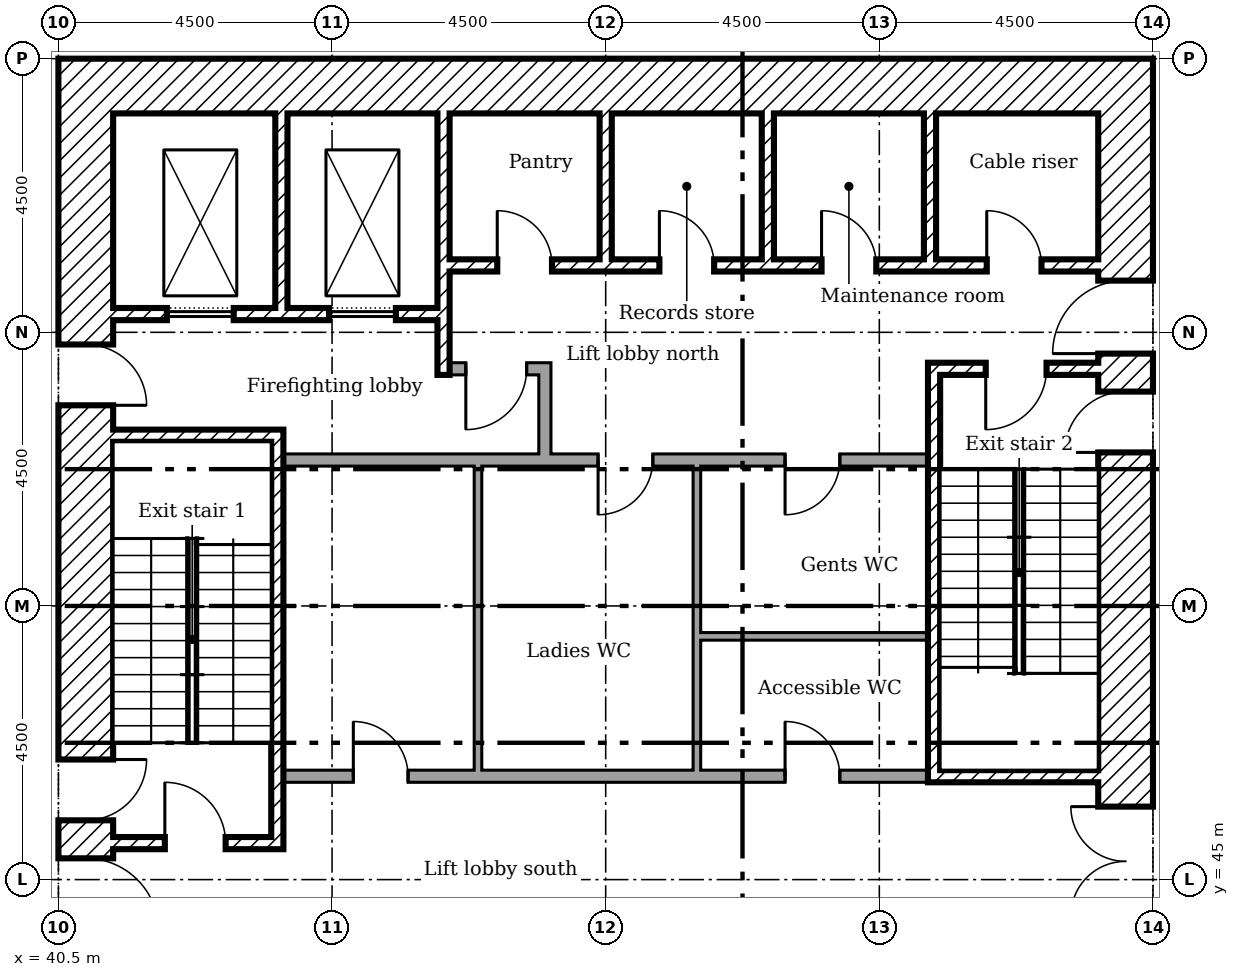
"""IFC4 building model, lengths in metres.
Left out: names, types, materials, properties, quantities, classifications, styles, units other than length and angle.
Written with IfcOpenShell. Run it as: python <this file> out.ifc"""

import sys

from ifc_helpers import new_model, si_unit, direction, frame, frame_2d, origin, place, context, subcontext, project, spatial, rectangle, extrude, element, fill, save


model = new_model("IFC4")
c1 = context("Model", 3, precision=1e-05, world=origin(), true_north=direction((0.0, 1.0)))
c2 = subcontext(c1, "Body", "Model", "MODEL_VIEW")
j1 = project(units=[si_unit("LENGTHUNIT", "METRE"), si_unit("PLANEANGLEUNIT", "RADIAN")], contexts=[c1])
p1 = place(None, origin())
s1 = spatial("IfcSite", under=j1, at=p1, CompositionType="ELEMENT")
p2 = place(p1, origin())
s2 = spatial("IfcBuilding", under=s1, at=p2, CompositionType="ELEMENT")
p3 = place(p2, frame((0.0, 0.0, 25.4)))
s3 = spatial("IfcBuildingStorey", under=s2, at=p3, CompositionType="ELEMENT", Elevation=25.4)
p4 = place(p3, frame((58.05, 40.5, 0.0), z_axis=(0.0, 0.0, 1.0), x_axis=(0.0, 1.0, 0.0)))
e1 = element("IfcWall", 1, at=p4, inside=s3, PredefinedType="SHEAR", context=c2, shape_type="SweptSolid", body=[
    extrude(rectangle(XDim=18.0, YDim=0.9, at=frame_2d((9.0, 0.0))), origin(), (0.0, 0.0, 1.0), 4.125),
])
p5 = place(p4, frame((13.15, 0.0, 0.0)))
e2 = element("IfcOpeningElement", 2, at=p5, cuts=e1, PredefinedType="OPENING", context=c2, shape_type="SweptSolid", body=[
    extrude(rectangle(XDim=1.2, YDim=2.1, at=frame_2d((0.6, 1.05))), frame((0.0, 0.46, 0.0), z_axis=(0.0, -1.0, 0.0), x_axis=(1.0, 0.0, 0.0)), (0.0, 0.0, 1.0), 0.92),
])
p6 = place(p4, frame((3.9, 0.0, 0.0)))
e3 = element("IfcOpeningElement", 3, at=p6, cuts=e1, PredefinedType="OPENING", context=c2, shape_type="SweptSolid", body=[
    extrude(rectangle(XDim=1.8, YDim=2.1, at=frame_2d((0.9, 1.05))), frame((0.0, 0.46, 0.0), z_axis=(0.0, -1.0, 0.0), x_axis=(1.0, 0.0, 0.0)), (0.0, 0.0, 1.0), 0.92),
])
p7 = place(p4, frame((11.525, 0.0, 0.0)))
e4 = element("IfcOpeningElement", 4, at=p7, cuts=e1, PredefinedType="OPENING", context=c2, shape_type="SweptSolid", body=[
    extrude(rectangle(XDim=1.0, YDim=2.1, at=frame_2d((0.5, 1.05))), frame((0.0, 0.46, 0.0), z_axis=(0.0, -1.0, 0.0), x_axis=(1.0, 0.0, 0.0)), (0.0, 0.0, 1.0), 0.92),
])
p8 = place(p3, frame((41.4, 58.05, 0.0)))
e5 = element("IfcWall", 5, at=p8, inside=s3, PredefinedType="SHEAR", context=c2, shape_type="SweptSolid", body=[
    extrude(rectangle(XDim=16.2, YDim=0.9, at=frame_2d((8.1, 0.0))), origin(), (0.0, 0.0, 1.0), 4.125),
])
p9 = place(p3, frame((40.95, 40.5, 0.0), z_axis=(0.0, 0.0, 1.0), x_axis=(0.0, 1.0, 0.0)))
e6 = element("IfcWall", 6, at=p9, inside=s3, PredefinedType="SHEAR", context=c2, shape_type="SweptSolid", body=[
    extrude(rectangle(XDim=18.0, YDim=0.9, at=frame_2d((9.0, 0.0))), origin(), (0.0, 0.0, 1.0), 4.125),
])
p10 = place(p9, frame((3.65, 0.0, 0.0)))
e7 = element("IfcOpeningElement", 7, at=p10, cuts=e6, PredefinedType="OPENING", context=c2, shape_type="SweptSolid", body=[
    extrude(rectangle(XDim=1.2, YDim=2.1, at=frame_2d((0.6, 1.05))), frame((0.0, 0.46, 0.0), z_axis=(0.0, -1.0, 0.0), x_axis=(1.0, 0.0, 0.0)), (0.0, 0.0, 1.0), 0.92),
])
p11 = place(p9, frame((5.475, 0.0, 0.0)))
e8 = element("IfcOpeningElement", 8, at=p11, cuts=e6, PredefinedType="OPENING", context=c2, shape_type="SweptSolid", body=[
    extrude(rectangle(XDim=1.0, YDim=2.1, at=frame_2d((0.5, 1.05))), frame((0.0, 0.46, 0.0), z_axis=(0.0, -1.0, 0.0), x_axis=(1.0, 0.0, 0.0)), (0.0, 0.0, 1.0), 0.92),
])
p12 = place(p9, frame((12.3, 0.0, 0.0)))
e9 = element("IfcOpeningElement", 9, at=p12, cuts=e6, PredefinedType="OPENING", context=c2, shape_type="SweptSolid", body=[
    extrude(rectangle(XDim=1.0, YDim=2.1, at=frame_2d((0.5, 1.05))), frame((0.0, 0.46, 0.0), z_axis=(0.0, -1.0, 0.0), x_axis=(1.0, 0.0, 0.0)), (0.0, 0.0, 1.0), 0.92),
])
p13 = place(p3, frame((44.167, 57.6, 0.0), z_axis=(0.0, 0.0, 1.0), x_axis=(0.0, -1.0, 0.0)))
e10 = element("IfcWall", 10, at=p13, inside=s3, PredefinedType="SHEAR", context=c2, shape_type="SweptSolid", body=[
    extrude(rectangle(XDim=3.2, YDim=0.2, at=frame_2d((1.6, 0.0))), origin(), (0.0, 0.0, 1.0), 4.125),
])
p14 = place(p3, frame((46.833, 57.6, 0.0), z_axis=(0.0, 0.0, 1.0), x_axis=(0.0, -1.0, 0.0)))
e11 = element("IfcWall", 11, at=p14, inside=s3, PredefinedType="SHEAR", context=c2, shape_type="SweptSolid", body=[
    extrude(rectangle(XDim=4.3, YDim=0.2, at=frame_2d((2.15, 0.0))), origin(), (0.0, 0.0, 1.0), 4.125),
])
for number, where, z_axis, x_axis in (
    (12, (49.5, 57.6, 0.0), (0.0, 0.0, 1.0), (0.0, -1.0, 0.0)),
    (13, (52.167, 57.6, 0.0), (0.0, 0.0, 1.0), (0.0, -1.0, 0.0)),
    (14, (54.833, 57.6, 0.0), (0.0, 0.0, 1.0), (0.0, -1.0, 0.0)),
):
    element("IfcWall", number, at=place(p3, frame(where, z_axis=z_axis, x_axis=x_axis)), inside=s3, PredefinedType="SHEAR", context=c2, shape_type="SweptSolid", body=[
        extrude(rectangle(XDim=2.4, YDim=0.2, at=frame_2d((1.2, 0.0))), origin(), (0.0, 0.0, 1.0), 4.125),
    ])
p15 = place(p3, frame((48.5, 51.9, 0.0), z_axis=(0.0, 0.0, 1.0), x_axis=(0.0, 1.0, 0.0)))
e15 = element("IfcWall", 15, at=p15, inside=s3, PredefinedType="PARTITIONING", context=c2, shape_type="SweptSolid", body=[
    extrude(rectangle(XDim=1.6, YDim=0.2, at=frame_2d((0.8, 0.0))), origin(), (0.0, 0.0, 1.0), 4.125),
])
p16 = place(p3, frame((46.933, 53.4, 0.0)))
e16 = element("IfcWall", 16, at=p16, inside=s3, PredefinedType="PARTITIONING", context=c2, shape_type="SweptSolid", body=[
    extrude(rectangle(XDim=1.467, YDim=0.2, at=frame_2d((0.733, 0.0))), origin(), (0.0, 0.0, 1.0), 4.125),
])
p17 = place(p16, frame((0.267, 0.0, 0.0)))
e17 = element("IfcOpeningElement", 17, at=p17, cuts=e16, PredefinedType="OPENING", context=c2, shape_type="SweptSolid", body=[
    extrude(rectangle(XDim=1.0, YDim=2.1, at=frame_2d((0.5, 1.05))), frame((0.0, 0.11, 0.0), z_axis=(0.0, -1.0, 0.0), x_axis=(1.0, 0.0, 0.0)), (0.0, 0.0, 1.0), 0.22),
])
p18 = place(p3, frame((46.933, 55.1, 0.0)))
e18 = element("IfcWall", 18, at=p18, inside=s3, PredefinedType="SHEAR", context=c2, shape_type="SweptSolid", body=[
    extrude(rectangle(XDim=10.667, YDim=0.2, at=frame_2d((5.333, 0.0))), origin(), (0.0, 0.0, 1.0), 4.125),
])
p19 = place(p18, frame((8.833, 0.0, 0.0)))
e19 = element("IfcOpeningElement", 19, at=p19, cuts=e18, PredefinedType="OPENING", context=c2, shape_type="SweptSolid", body=[
    extrude(rectangle(XDim=0.9, YDim=2.1, at=frame_2d((0.45, 1.05))), frame((0.0, 0.11, 0.0), z_axis=(0.0, -1.0, 0.0), x_axis=(1.0, 0.0, 0.0)), (0.0, 0.0, 1.0), 0.22),
])
p20 = place(p18, frame((0.783, 0.0, 0.0)))
e20 = element("IfcOpeningElement", 20, at=p20, cuts=e18, PredefinedType="OPENING", context=c2, shape_type="SweptSolid", body=[
    extrude(rectangle(XDim=0.9, YDim=2.1, at=frame_2d((0.45, 1.05))), frame((0.0, 0.11, 0.0), z_axis=(0.0, -1.0, 0.0), x_axis=(1.0, 0.0, 0.0)), (0.0, 0.0, 1.0), 0.22),
])
p21 = place(p18, frame((3.45, 0.0, 0.0)))
e21 = element("IfcOpeningElement", 21, at=p21, cuts=e18, PredefinedType="OPENING", context=c2, shape_type="SweptSolid", body=[
    extrude(rectangle(XDim=0.9, YDim=2.1, at=frame_2d((0.45, 1.05))), frame((0.0, 0.11, 0.0), z_axis=(0.0, -1.0, 0.0), x_axis=(1.0, 0.0, 0.0)), (0.0, 0.0, 1.0), 0.22),
])
p22 = place(p18, frame((6.117, 0.0, 0.0)))
e22 = element("IfcOpeningElement", 22, at=p22, cuts=e18, PredefinedType="OPENING", context=c2, shape_type="SweptSolid", body=[
    extrude(rectangle(XDim=0.9, YDim=2.1, at=frame_2d((0.45, 1.05))), frame((0.0, 0.11, 0.0), z_axis=(0.0, -1.0, 0.0), x_axis=(1.0, 0.0, 0.0)), (0.0, 0.0, 1.0), 0.22),
])
p23 = place(p3, frame((41.4, 54.3, 0.0)))
e23 = element("IfcWall", 23, at=p23, inside=s3, PredefinedType="SHEAR", context=c2, shape_type="SweptSolid", body=[
    extrude(rectangle(XDim=5.333, YDim=0.2, at=frame_2d((2.667, 0.0))), origin(), (0.0, 0.0, 1.0), 4.125),
])
p24 = place(p23, frame((0.883, 0.0, 0.0)))
e24 = element("IfcOpeningElement", 24, at=p24, cuts=e23, PredefinedType="OPENING", context=c2, shape_type="SweptSolid", body=[
    extrude(rectangle(XDim=1.1, YDim=2.1, at=frame_2d((0.55, 1.05))), frame((0.0, 0.11, 0.0), z_axis=(0.0, -1.0, 0.0), x_axis=(1.0, 0.0, 0.0)), (0.0, 0.0, 1.0), 0.22),
])
p25 = place(p23, frame((3.55, 0.0, 0.0)))
e25 = element("IfcOpeningElement", 25, at=p25, cuts=e23, PredefinedType="OPENING", context=c2, shape_type="SweptSolid", body=[
    extrude(rectangle(XDim=1.1, YDim=2.1, at=frame_2d((0.55, 1.05))), frame((0.0, 0.11, 0.0), z_axis=(0.0, -1.0, 0.0), x_axis=(1.0, 0.0, 0.0)), (0.0, 0.0, 1.0), 0.22),
])
p26 = place(p3, frame((44.1, 45.5, 0.0), z_axis=(0.0, 0.0, 1.0), x_axis=(0.0, 1.0, 0.0)))
e26 = element("IfcWall", 26, at=p26, inside=s3, PredefinedType="SHEAR", context=c2, shape_type="SweptSolid", body=[
    extrude(rectangle(XDim=6.9, YDim=0.2, at=frame_2d((3.45, 0.0))), origin(), (0.0, 0.0, 1.0), 4.125),
])
p27 = place(p3, frame((41.4, 52.3, 0.0)))
e27 = element("IfcWall", 27, at=p27, inside=s3, PredefinedType="SHEAR", context=c2, shape_type="SweptSolid", body=[
    extrude(rectangle(XDim=2.6, YDim=0.2, at=frame_2d((1.3, 0.0))), origin(), (0.0, 0.0, 1.0), 4.125),
])
p28 = place(p3, frame((41.4, 45.6, 0.0)))
e28 = element("IfcWall", 28, at=p28, inside=s3, PredefinedType="SHEAR", context=c2, shape_type="SweptSolid", body=[
    extrude(rectangle(XDim=2.6, YDim=0.2, at=frame_2d((1.3, 0.0))), origin(), (0.0, 0.0, 1.0), 4.125),
])
p29 = place(p28, frame((0.85, 0.0, 0.0)))
e29 = element("IfcOpeningElement", 29, at=p29, cuts=e28, PredefinedType="OPENING", context=c2, shape_type="SweptSolid", body=[
    extrude(rectangle(XDim=1.0, YDim=2.1, at=frame_2d((0.5, 1.05))), frame((0.0, 0.11, 0.0), z_axis=(0.0, -1.0, 0.0), x_axis=(1.0, 0.0, 0.0)), (0.0, 0.0, 1.0), 0.22),
])
p30 = place(p3, frame((54.8, 53.4, 0.0)))
e30 = element("IfcWall", 30, at=p30, inside=s3, PredefinedType="SHEAR", context=c2, shape_type="SweptSolid", body=[
    extrude(rectangle(XDim=2.8, YDim=0.2, at=frame_2d((1.4, 0.0))), origin(), (0.0, 0.0, 1.0), 4.125),
])
p31 = place(p30, frame((0.95, 0.0, 0.0)))
e31 = element("IfcOpeningElement", 31, at=p31, cuts=e30, PredefinedType="OPENING", context=c2, shape_type="SweptSolid", body=[
    extrude(rectangle(XDim=1.0, YDim=2.1, at=frame_2d((0.5, 1.05))), frame((0.0, 0.11, 0.0), z_axis=(0.0, -1.0, 0.0), x_axis=(1.0, 0.0, 0.0)), (0.0, 0.0, 1.0), 0.22),
])
p32 = place(p3, frame((54.8, 46.7, 0.0)))
e32 = element("IfcWall", 32, at=p32, inside=s3, PredefinedType="SHEAR", context=c2, shape_type="SweptSolid", body=[
    extrude(rectangle(XDim=2.8, YDim=0.2, at=frame_2d((1.4, 0.0))), origin(), (0.0, 0.0, 1.0), 4.125),
])
p33 = place(p3, frame((54.9, 46.8, 0.0), z_axis=(0.0, 0.0, 1.0), x_axis=(0.0, 1.0, 0.0)))
e33 = element("IfcWall", 33, at=p33, inside=s3, PredefinedType="SHEAR", context=c2, shape_type="SweptSolid", body=[
    extrude(rectangle(XDim=6.5, YDim=0.2, at=frame_2d((3.25, 0.0))), origin(), (0.0, 0.0, 1.0), 4.125),
])
p34 = place(p3, frame((44.2, 51.9, 0.0)))
e34 = element("IfcWall", 34, at=p34, inside=s3, PredefinedType="PARTITIONING", context=c2, shape_type="SweptSolid", body=[
    extrude(rectangle(XDim=10.6, YDim=0.2, at=frame_2d((5.3, 0.0))), origin(), (0.0, 0.0, 1.0), 4.125),
])
p35 = place(p34, frame((5.175, 0.0, 0.0)))
e35 = element("IfcOpeningElement", 35, at=p35, cuts=e34, PredefinedType="OPENING", context=c2, shape_type="SweptSolid", body=[
    extrude(rectangle(XDim=0.9, YDim=2.1, at=frame_2d((0.45, 1.05))), frame((0.0, 0.11, 0.0), z_axis=(0.0, -1.0, 0.0), x_axis=(1.0, 0.0, 0.0)), (0.0, 0.0, 1.0), 0.22),
])
p36 = place(p34, frame((8.25, 0.0, 0.0)))
e36 = element("IfcOpeningElement", 36, at=p36, cuts=e34, PredefinedType="OPENING", context=c2, shape_type="SweptSolid", body=[
    extrude(rectangle(XDim=0.9, YDim=2.1, at=frame_2d((0.45, 1.05))), frame((0.0, 0.11, 0.0), z_axis=(0.0, -1.0, 0.0), x_axis=(1.0, 0.0, 0.0)), (0.0, 0.0, 1.0), 0.22),
])
p37 = place(p3, frame((44.2, 46.7, 0.0)))
e37 = element("IfcWall", 37, at=p37, inside=s3, PredefinedType="PARTITIONING", context=c2, shape_type="SweptSolid", body=[
    extrude(rectangle(XDim=10.6, YDim=0.2, at=frame_2d((5.3, 0.0))), origin(), (0.0, 0.0, 1.0), 4.125),
])
p38 = place(p37, frame((1.15, 0.0, 0.0)))
e38 = element("IfcOpeningElement", 38, at=p38, cuts=e37, PredefinedType="OPENING", context=c2, shape_type="SweptSolid", body=[
    extrude(rectangle(XDim=0.9, YDim=2.1, at=frame_2d((0.45, 1.05))), frame((0.0, 0.11, 0.0), z_axis=(0.0, -1.0, 0.0), x_axis=(1.0, 0.0, 0.0)), (0.0, 0.0, 1.0), 0.22),
])
p39 = place(p37, frame((8.25, 0.0, 0.0)))
e39 = element("IfcOpeningElement", 39, at=p39, cuts=e37, PredefinedType="OPENING", context=c2, shape_type="SweptSolid", body=[
    extrude(rectangle(XDim=0.9, YDim=2.1, at=frame_2d((0.45, 1.05))), frame((0.0, 0.11, 0.0), z_axis=(0.0, -1.0, 0.0), x_axis=(1.0, 0.0, 0.0)), (0.0, 0.0, 1.0), 0.22),
])
p40 = place(p3, frame((47.4, 46.8, 0.0), z_axis=(0.0, 0.0, 1.0), x_axis=(0.0, 1.0, 0.0)))
e40 = element("IfcWall", 40, at=p40, inside=s3, PredefinedType="PARTITIONING", context=c2, shape_type="SweptSolid", body=[
    extrude(rectangle(XDim=5.0, YDim=0.125, at=frame_2d((2.5, 0.0))), origin(), (0.0, 0.0, 1.0), 4.125),
])
p41 = place(p3, frame((51.0, 46.8, 0.0), z_axis=(0.0, 0.0, 1.0), x_axis=(0.0, 1.0, 0.0)))
e41 = element("IfcWall", 41, at=p41, inside=s3, PredefinedType="PARTITIONING", context=c2, shape_type="SweptSolid", body=[
    extrude(rectangle(XDim=2.262, YDim=0.125, at=frame_2d((1.131, 0.0))), origin(), (0.0, 0.0, 1.0), 4.125),
])
p42 = place(p3, frame((54.8, 49.0, 0.0), z_axis=(0.0, 0.0, 1.0), x_axis=(-1.0, 0.0, 0.0)))
e42 = element("IfcWall", 42, at=p42, inside=s3, PredefinedType="PARTITIONING", context=c2, shape_type="SweptSolid", body=[
    extrude(rectangle(XDim=3.738, YDim=0.125, at=frame_2d((1.869, 0.0))), origin(), (0.0, 0.0, 1.0), 4.125),
])
p43 = place(p3, frame((51.0, 49.0, 0.0), z_axis=(0.0, 0.0, 1.0), x_axis=(0.0, 1.0, 0.0)))
e43 = element("IfcWall", 43, at=p43, inside=s3, PredefinedType="PARTITIONING", context=c2, shape_type="SweptSolid", body=[
    extrude(rectangle(XDim=2.8, YDim=0.125, at=frame_2d((1.4, 0.0))), origin(), (0.0, 0.0, 1.0), 4.125),
])
p44 = place(p5, origin())
e44 = element("IfcDoor", 44, at=p44, inside=s3, OperationType="SINGLE_SWING_RIGHT", PredefinedType="DOOR", context=c2, shape_type="SweptSolid", body=[
    extrude(rectangle(XDim=1.2, YDim=2.1, at=frame_2d((0.6, 1.05))), frame((0.0, 0.025, 0.0), z_axis=(0.0, -1.0, 0.0), x_axis=(1.0, 0.0, 0.0)), (0.0, 0.0, 1.0), 0.05),
])
fill(e2, e44)
p45 = place(p6, origin())
e45 = element("IfcDoor", 45, at=p45, inside=s3, OperationType="DOUBLE_DOOR_SINGLE_SWING", PredefinedType="DOOR", context=c2, shape_type="SweptSolid", body=[
    extrude(rectangle(XDim=1.8, YDim=2.1, at=frame_2d((0.9, 1.05))), frame((0.0, 0.025, 0.0), z_axis=(0.0, -1.0, 0.0), x_axis=(1.0, 0.0, 0.0)), (0.0, 0.0, 1.0), 0.05),
])
fill(e3, e45)
p46 = place(p10, frame((1.2, 0.0, 0.0), x_axis=(-1.0, 0.0, 0.0)))
e46 = element("IfcDoor", 46, at=p46, inside=s3, OperationType="SINGLE_SWING_LEFT", PredefinedType="DOOR", context=c2, shape_type="SweptSolid", body=[
    extrude(rectangle(XDim=1.2, YDim=2.1, at=frame_2d((0.6, 1.05))), frame((0.0, 0.025, 0.0), z_axis=(0.0, -1.0, 0.0), x_axis=(1.0, 0.0, 0.0)), (0.0, 0.0, 1.0), 0.05),
])
fill(e7, e46)
p47 = place(p29, origin())
e47 = element("IfcDoor", 47, at=p47, inside=s3, OperationType="SINGLE_SWING_RIGHT", PredefinedType="DOOR", context=c2, shape_type="SweptSolid", body=[
    extrude(rectangle(XDim=1.0, YDim=2.1, at=frame_2d((0.5, 1.05))), frame((0.0, 0.025, 0.0), z_axis=(0.0, -1.0, 0.0), x_axis=(1.0, 0.0, 0.0)), (0.0, 0.0, 1.0), 0.05),
])
fill(e29, e47)
p48 = place(p11, frame((1.0, 0.0, 0.0), x_axis=(-1.0, 0.0, 0.0)))
e48 = element("IfcDoor", 48, at=p48, inside=s3, OperationType="SINGLE_SWING_RIGHT", PredefinedType="DOOR", context=c2, shape_type="SweptSolid", body=[
    extrude(rectangle(XDim=1.0, YDim=2.1, at=frame_2d((0.5, 1.05))), frame((0.0, 0.025, 0.0), z_axis=(0.0, -1.0, 0.0), x_axis=(1.0, 0.0, 0.0)), (0.0, 0.0, 1.0), 0.05),
])
fill(e8, e48)
p49 = place(p31, frame((1.0, 0.0, 0.0), x_axis=(-1.0, 0.0, 0.0)))
e49 = element("IfcDoor", 49, at=p49, inside=s3, OperationType="SINGLE_SWING_LEFT", PredefinedType="DOOR", context=c2, shape_type="SweptSolid", body=[
    extrude(rectangle(XDim=1.0, YDim=2.1, at=frame_2d((0.5, 1.05))), frame((0.0, 0.025, 0.0), z_axis=(0.0, -1.0, 0.0), x_axis=(1.0, 0.0, 0.0)), (0.0, 0.0, 1.0), 0.05),
])
fill(e31, e49)
p50 = place(p7, origin())
e50 = element("IfcDoor", 50, at=p50, inside=s3, OperationType="SINGLE_SWING_RIGHT", PredefinedType="DOOR", context=c2, shape_type="SweptSolid", body=[
    extrude(rectangle(XDim=1.0, YDim=2.1, at=frame_2d((0.5, 1.05))), frame((0.0, 0.025, 0.0), z_axis=(0.0, -1.0, 0.0), x_axis=(1.0, 0.0, 0.0)), (0.0, 0.0, 1.0), 0.05),
])
fill(e4, e50)
p51 = place(p17, frame((1.0, 0.0, 0.0), x_axis=(-1.0, 0.0, 0.0)))
e51 = element("IfcDoor", 51, at=p51, inside=s3, OperationType="SINGLE_SWING_LEFT", PredefinedType="DOOR", context=c2, shape_type="SweptSolid", body=[
    extrude(rectangle(XDim=1.0, YDim=2.1, at=frame_2d((0.5, 1.05))), frame((0.0, 0.025, 0.0), z_axis=(0.0, -1.0, 0.0), x_axis=(1.0, 0.0, 0.0)), (0.0, 0.0, 1.0), 0.05),
])
fill(e17, e51)
p52 = place(p12, frame((1.0, 0.0, 0.0), x_axis=(-1.0, 0.0, 0.0)))
e52 = element("IfcDoor", 52, at=p52, inside=s3, OperationType="SINGLE_SWING_LEFT", PredefinedType="DOOR", context=c2, shape_type="SweptSolid", body=[
    extrude(rectangle(XDim=1.0, YDim=2.1, at=frame_2d((0.5, 1.05))), frame((0.0, 0.025, 0.0), z_axis=(0.0, -1.0, 0.0), x_axis=(1.0, 0.0, 0.0)), (0.0, 0.0, 1.0), 0.05),
])
fill(e9, e52)
p53 = place(p19, origin())
e53 = element("IfcDoor", 53, at=p53, inside=s3, OperationType="SINGLE_SWING_RIGHT", PredefinedType="DOOR", context=c2, shape_type="SweptSolid", body=[
    extrude(rectangle(XDim=0.9, YDim=2.1, at=frame_2d((0.45, 1.05))), frame((0.0, 0.025, 0.0), z_axis=(0.0, -1.0, 0.0), x_axis=(1.0, 0.0, 0.0)), (0.0, 0.0, 1.0), 0.05),
])
fill(e19, e53)
p54 = place(p20, origin())
e54 = element("IfcDoor", 54, at=p54, inside=s3, OperationType="SINGLE_SWING_RIGHT", PredefinedType="DOOR", context=c2, shape_type="SweptSolid", body=[
    extrude(rectangle(XDim=0.9, YDim=2.1, at=frame_2d((0.45, 1.05))), frame((0.0, 0.025, 0.0), z_axis=(0.0, -1.0, 0.0), x_axis=(1.0, 0.0, 0.0)), (0.0, 0.0, 1.0), 0.05),
])
fill(e20, e54)
p55 = place(p21, origin())
e55 = element("IfcDoor", 55, at=p55, inside=s3, OperationType="SINGLE_SWING_RIGHT", PredefinedType="DOOR", context=c2, shape_type="SweptSolid", body=[
    extrude(rectangle(XDim=0.9, YDim=2.1, at=frame_2d((0.45, 1.05))), frame((0.0, 0.025, 0.0), z_axis=(0.0, -1.0, 0.0), x_axis=(1.0, 0.0, 0.0)), (0.0, 0.0, 1.0), 0.05),
])
fill(e21, e55)
p56 = place(p22, origin())
e56 = element("IfcDoor", 56, at=p56, inside=s3, OperationType="SINGLE_SWING_RIGHT", PredefinedType="DOOR", context=c2, shape_type="SweptSolid", body=[
    extrude(rectangle(XDim=0.9, YDim=2.1, at=frame_2d((0.45, 1.05))), frame((0.0, 0.025, 0.0), z_axis=(0.0, -1.0, 0.0), x_axis=(1.0, 0.0, 0.0)), (0.0, 0.0, 1.0), 0.05),
])
fill(e22, e56)
p57 = place(p38, origin())
e57 = element("IfcDoor", 57, at=p57, inside=s3, OperationType="SINGLE_SWING_RIGHT", PredefinedType="DOOR", context=c2, shape_type="SweptSolid", body=[
    extrude(rectangle(XDim=0.9, YDim=2.1, at=frame_2d((0.45, 1.05))), frame((0.0, 0.025, 0.0), z_axis=(0.0, -1.0, 0.0), x_axis=(1.0, 0.0, 0.0)), (0.0, 0.0, 1.0), 0.05),
])
fill(e38, e57)
p58 = place(p35, frame((0.9, 0.0, 0.0), x_axis=(-1.0, 0.0, 0.0)))
e58 = element("IfcDoor", 58, at=p58, inside=s3, OperationType="SINGLE_SWING_LEFT", PredefinedType="DOOR", context=c2, shape_type="SweptSolid", body=[
    extrude(rectangle(XDim=0.9, YDim=2.1, at=frame_2d((0.45, 1.05))), frame((0.0, 0.025, 0.0), z_axis=(0.0, -1.0, 0.0), x_axis=(1.0, 0.0, 0.0)), (0.0, 0.0, 1.0), 0.05),
])
fill(e35, e58)
p59 = place(p39, origin())
e59 = element("IfcDoor", 59, at=p59, inside=s3, OperationType="SINGLE_SWING_RIGHT", PredefinedType="DOOR", context=c2, shape_type="SweptSolid", body=[
    extrude(rectangle(XDim=0.9, YDim=2.1, at=frame_2d((0.45, 1.05))), frame((0.0, 0.025, 0.0), z_axis=(0.0, -1.0, 0.0), x_axis=(1.0, 0.0, 0.0)), (0.0, 0.0, 1.0), 0.05),
])
fill(e39, e59)
p60 = place(p36, frame((0.9, 0.0, 0.0), x_axis=(-1.0, 0.0, 0.0)))
e60 = element("IfcDoor", 60, at=p60, inside=s3, OperationType="SINGLE_SWING_LEFT", PredefinedType="DOOR", context=c2, shape_type="SweptSolid", body=[
    extrude(rectangle(XDim=0.9, YDim=2.1, at=frame_2d((0.45, 1.05))), frame((0.0, 0.025, 0.0), z_axis=(0.0, -1.0, 0.0), x_axis=(1.0, 0.0, 0.0)), (0.0, 0.0, 1.0), 0.05),
])
fill(e36, e60)
p61 = place(p24, origin())
e61 = element("IfcDoor", 61, at=p61, inside=s3, OperationType="SLIDING_TO_LEFT", PredefinedType="DOOR", context=c2, shape_type="SweptSolid", body=[
    extrude(rectangle(XDim=1.1, YDim=2.1, at=frame_2d((0.55, 1.05))), frame((0.0, 0.025, 0.0), z_axis=(0.0, -1.0, 0.0), x_axis=(1.0, 0.0, 0.0)), (0.0, 0.0, 1.0), 0.05),
])
fill(e24, e61)
p62 = place(p25, origin())
e62 = element("IfcDoor", 62, at=p62, inside=s3, OperationType="SLIDING_TO_LEFT", PredefinedType="DOOR", context=c2, shape_type="SweptSolid", body=[
    extrude(rectangle(XDim=1.1, YDim=2.1, at=frame_2d((0.55, 1.05))), frame((0.0, 0.025, 0.0), z_axis=(0.0, -1.0, 0.0), x_axis=(1.0, 0.0, 0.0)), (0.0, 0.0, 1.0), 0.05),
])
fill(e25, e62)
save(model, sys.argv[1])
